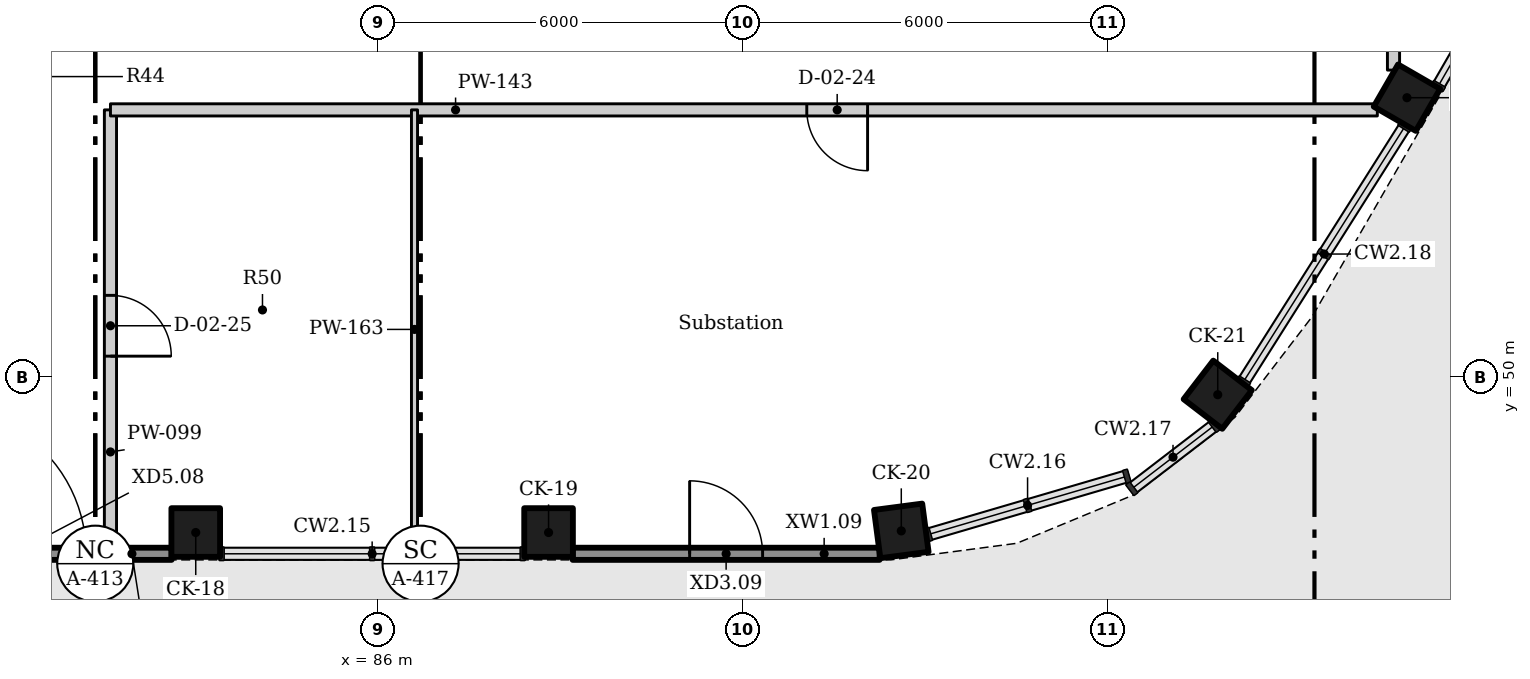
"""IFC4 building model, lengths in metres.
Left out: names, types, materials, properties, quantities, classifications, styles, units other than length and angle.
Written with IfcOpenShell. Run it as: python <this file> out.ifc"""

import sys

from ifc_helpers import new_model, si_unit, direction, frame, frame_2d, origin, origin_2d, place, context, subcontext, project, spatial, rectangle, extrude, element, fill, save


model = new_model("IFC4")
c1 = context("Model", 3, precision=1e-05, world=origin(), true_north=direction((0.0, 1.0)))
c2 = subcontext(c1, "Body", "Model", "MODEL_VIEW")
j1 = project(units=[si_unit("LENGTHUNIT", "METRE"), si_unit("PLANEANGLEUNIT", "RADIAN")], contexts=[c1])
p1 = place(None, origin())
s1 = spatial("IfcSite", under=j1, at=p1, CompositionType="ELEMENT")
p2 = place(p1, origin())
s2 = spatial("IfcBuilding", under=s1, at=p2, CompositionType="ELEMENT")
p3 = place(p2, origin())
s3 = spatial("IfcBuildingStorey", under=s2, at=p3, CompositionType="ELEMENT", Elevation=0.0)
for number, where, z_axis, x_axis in (
    (1, (83.002, 47.45, -1.8), (0.0, 0.0, 1.0), (1.0, 0.0, 0.0)),
    (2, (88.805, 47.45, -1.8), (0.0, 0.0, 1.0), (1.0, 0.0, 0.0)),
    (3, (94.605, 47.477, -1.8), (0.0, 0.0, 1.0), (0.991, 0.131, 0.0)),
    (4, (99.81, 49.716, -1.8), (0.0, 0.0, 1.0), (0.609, 0.793, 0.0)),
    (5, (102.921, 54.6, -1.8), (0.0, 0.0, 1.0), (0.5, 0.866, 0.0)),
):
    element("IfcColumn", number, at=place(p3, frame(where, z_axis=z_axis, x_axis=x_axis)), inside=s3, PredefinedType="COLUMN", context=c2, shape_type="SweptSolid", body=[
        extrude(rectangle(XDim=0.8, YDim=0.8, at=origin_2d()), origin(), (0.0, 0.0, 1.0), 8.4),
    ])
p4 = place(p3, frame((77.596, 47.1, 0.0), z_axis=(0.0, 0.0, 1.0), x_axis=(1.0, 0.0, 0.0)))
e6 = element("IfcWall", 6, at=p4, inside=s3, PredefinedType="SOLIDWALL", context=c2, shape_type="SweptSolid", body=[
    extrude(rectangle(XDim=5.01, YDim=0.2, at=frame_2d((2.505, 0.0))), origin(), (0.0, 0.0, 1.0), 5.4),
])
p5 = place(p4, frame((1.204, 0.0, 0.0)))
e7 = element("IfcOpeningElement", 7, at=p5, cuts=e6, PredefinedType="OPENING", context=c2, shape_type="SweptSolid", body=[
    extrude(rectangle(XDim=2.4, YDim=2.7, at=frame_2d((1.2, 1.35))), frame((0.0, 0.11, 0.0), z_axis=(0.0, -1.0, 0.0), x_axis=(1.0, 0.0, 0.0)), (0.0, 0.0, 1.0), 0.22),
])
p6 = place(p3, frame((89.201, 47.1, 0.0), z_axis=(0.0, 0.0, 1.0), x_axis=(1.0, 0.0, 0.0)))
e8 = element("IfcWall", 8, at=p6, inside=s3, PredefinedType="SOLIDWALL", context=c2, shape_type="SweptSolid", body=[
    extrude(rectangle(XDim=5.048, YDim=0.2, at=frame_2d((2.524, 0.0))), origin(), (0.0, 0.0, 1.0), 5.4),
])
p7 = place(p6, frame((1.924, 0.0, 0.0)))
e9 = element("IfcOpeningElement", 9, at=p7, cuts=e8, PredefinedType="OPENING", context=c2, shape_type="SweptSolid", body=[
    extrude(rectangle(XDim=1.2, YDim=2.4, at=frame_2d((0.6, 1.2))), frame((0.0, 0.11, 0.0), z_axis=(0.0, -1.0, 0.0), x_axis=(1.0, 0.0, 0.0)), (0.0, 0.0, 1.0), 0.22),
])
p8 = place(p3, frame((102.7, 61.553, 0.0), z_axis=(0.0, 0.0, 1.0), x_axis=(0.0, -1.0, 0.0)))
e10 = element("IfcWall", 10, at=p8, inside=s3, PredefinedType="PARTITIONING", context=c2, shape_type="SweptSolid", body=[
    extrude(rectangle(XDim=6.499, YDim=0.2, at=frame_2d((3.249, 0.0))), origin(), (0.0, 0.0, 1.0), 6.3),
])
p9 = place(p8, frame((2.75, 0.0, 0.0)))
e11 = element("IfcOpeningElement", 11, at=p9, cuts=e10, PredefinedType="OPENING", context=c2, shape_type="SweptSolid", body=[
    extrude(rectangle(XDim=1.0, YDim=2.1, at=frame_2d((0.5, 1.05))), frame((0.0, 0.11, 0.0), z_axis=(0.0, -1.0, 0.0), x_axis=(1.0, 0.0, 0.0)), (0.0, 0.0, 1.0), 0.22),
])
p10 = place(p3, frame((81.6, 54.4, 0.0), z_axis=(0.0, 0.0, 1.0), x_axis=(0.0, -1.0, 0.0)))
e12 = element("IfcWall", 12, at=p10, inside=s3, PredefinedType="PARTITIONING", context=c2, shape_type="SweptSolid", body=[
    extrude(rectangle(XDim=7.1, YDim=0.2, at=frame_2d((3.55, 0.0))), origin(), (0.0, 0.0, 1.0), 5.53),
])
p11 = place(p10, frame((3.05, 0.0, 0.0)))
e13 = element("IfcOpeningElement", 13, at=p11, cuts=e12, PredefinedType="OPENING", context=c2, shape_type="SweptSolid", body=[
    extrude(rectangle(XDim=1.0, YDim=2.1, at=frame_2d((0.5, 1.05))), frame((0.0, 0.11, 0.0), z_axis=(0.0, -1.0, 0.0), x_axis=(1.0, 0.0, 0.0)), (0.0, 0.0, 1.0), 0.22),
])
p12 = place(p3, frame((102.434, 54.4, 0.0), z_axis=(0.0, 0.0, 1.0), x_axis=(-1.0, 0.0, 0.0)))
e14 = element("IfcWall", 14, at=p12, inside=s3, PredefinedType="PARTITIONING", context=c2, shape_type="SweptSolid", body=[
    extrude(rectangle(XDim=20.834, YDim=0.2, at=frame_2d((10.417, 0.0))), origin(), (0.0, 0.0, 1.0), 6.3),
])
p13 = place(p12, frame((8.383, 0.0, 0.0)))
e15 = element("IfcOpeningElement", 15, at=p13, cuts=e14, PredefinedType="OPENING", context=c2, shape_type="SweptSolid", body=[
    extrude(rectangle(XDim=1.0, YDim=2.1, at=frame_2d((0.5, 1.05))), frame((0.0, 0.11, 0.0), z_axis=(0.0, -1.0, 0.0), x_axis=(1.0, 0.0, 0.0)), (0.0, 0.0, 1.0), 0.22),
])
p14 = place(p3, frame((86.6, 47.18, 0.0), z_axis=(0.0, 0.0, 1.0), x_axis=(0.0, 1.0, 0.0)))
e16 = element("IfcWall", 16, at=p14, inside=s3, PredefinedType="PARTITIONING", context=c2, shape_type="SweptSolid", body=[
    extrude(rectangle(XDim=7.22, YDim=0.1, at=frame_2d((3.61, 0.0))), origin(), (0.0, 0.0, 1.0), 5.53),
])
p15 = place(p5, frame((2.4, 0.0, 0.0), z_axis=(0.0, 0.0, 1.0), x_axis=(-1.0, 0.0, 0.0)))
e17 = element("IfcDoor", 17, at=p15, inside=s3, OperationType="DOUBLE_DOOR_DOUBLE_SWING", PredefinedType="DOOR", context=c2, shape_type="SweptSolid", body=[
    extrude(rectangle(XDim=2.4, YDim=2.7, at=frame_2d((1.2, 1.35))), frame((0.0, 0.025, 0.0), z_axis=(0.0, -1.0, 0.0), x_axis=(1.0, 0.0, 0.0)), (0.0, 0.0, 1.0), 0.05),
])
fill(e7, e17)
p16 = place(p7, frame((1.2, 0.0, 0.0), z_axis=(0.0, 0.0, 1.0), x_axis=(-1.0, 0.0, 0.0)))
e18 = element("IfcDoor", 18, at=p16, inside=s3, OperationType="SINGLE_SWING_LEFT", PredefinedType="DOOR", context=c2, shape_type="SweptSolid", body=[
    extrude(rectangle(XDim=1.2, YDim=2.4, at=frame_2d((0.6, 1.2))), frame((0.0, 0.025, 0.0), z_axis=(0.0, -1.0, 0.0), x_axis=(1.0, 0.0, 0.0)), (0.0, 0.0, 1.0), 0.05),
])
fill(e9, e18)
p17 = place(p13, origin())
e19 = element("IfcDoor", 19, at=p17, inside=s3, OperationType="SINGLE_SWING_LEFT", PredefinedType="DOOR", context=c2, shape_type="SweptSolid", body=[
    extrude(rectangle(XDim=1.0, YDim=2.1, at=frame_2d((0.5, 1.05))), frame((0.0, 0.025, 0.0), z_axis=(0.0, -1.0, 0.0), x_axis=(1.0, 0.0, 0.0)), (0.0, 0.0, 1.0), 0.05),
])
fill(e15, e19)
p18 = place(p11, origin())
e20 = element("IfcDoor", 20, at=p18, inside=s3, OperationType="SINGLE_SWING_RIGHT", PredefinedType="DOOR", context=c2, shape_type="SweptSolid", body=[
    extrude(rectangle(XDim=1.0, YDim=2.1, at=frame_2d((0.5, 1.05))), frame((0.0, 0.025, 0.0), z_axis=(0.0, -1.0, 0.0), x_axis=(1.0, 0.0, 0.0)), (0.0, 0.0, 1.0), 0.05),
])
fill(e13, e20)
save(model, sys.argv[1])
